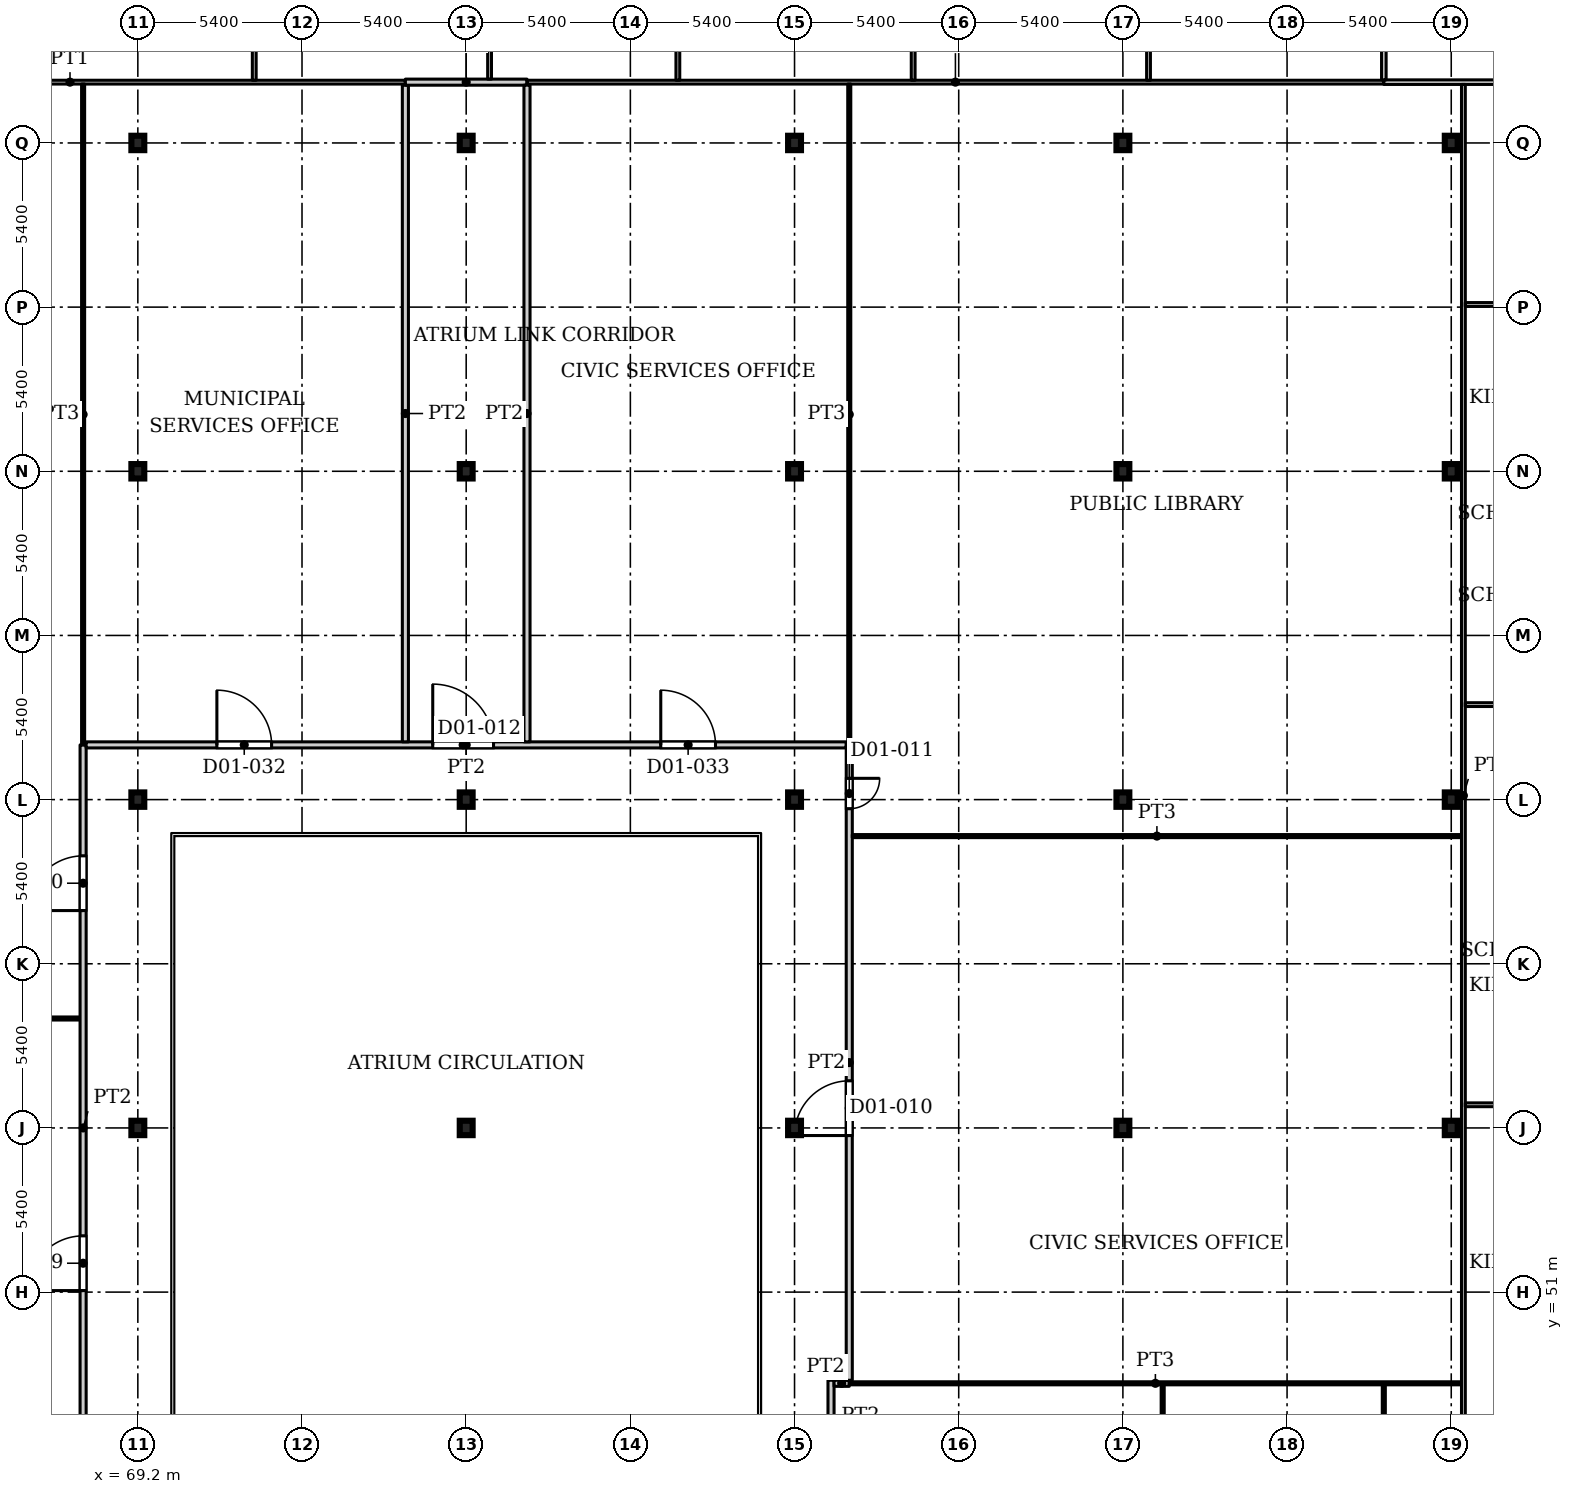
"""IFC4 building model, lengths in metres.
Left out: names, types, materials, properties, quantities, classifications, styles, units other than length and angle.
Written with IfcOpenShell. Run it as: python <this file> out.ifc"""

import sys

from ifc_helpers import new_model, si_unit, direction, frame, frame_2d, origin, origin_2d, place, context, subcontext, project, spatial, rectangle, i_section, extrude, source, transform, mapped, element, fill, save


model = new_model("IFC4")
c1 = context("Model", 3, precision=1e-05, world=origin(), true_north=direction((0.0, 1.0)))
c2 = subcontext(c1, "Body", "Model", "MODEL_VIEW")
j1 = project(units=[si_unit("LENGTHUNIT", "METRE"), si_unit("PLANEANGLEUNIT", "RADIAN")], contexts=[c1])
p1 = place(None, origin())
s1 = spatial("IfcSite", under=j1, at=p1, CompositionType="ELEMENT")
p2 = place(p1, origin())
s2 = spatial("IfcBuilding", under=s1, at=p2, CompositionType="ELEMENT")
p3 = place(p2, frame((0.0, 0.0, 7.5)))
s3 = spatial("IfcBuildingStorey", under=s2, at=p3, CompositionType="ELEMENT", Elevation=7.5)
for number, where, z_axis, x_axis in (
    (1, (69.2, 56.4, 0.0), (0.0, 0.0, 1.0), (1.0, 0.0, 0.0)),
    (2, (80.0, 56.4, 0.0), (0.0, 0.0, 1.0), (1.0, 0.0, 0.0)),
    (3, (90.8, 56.4, 0.0), (0.0, 0.0, 1.0), (1.0, 0.0, 0.0)),
    (4, (101.6, 56.4, 0.0), (0.0, 0.0, 1.0), (1.0, 0.0, 0.0)),
    (5, (112.4, 56.4, 0.0), (0.0, 0.0, 1.0), (1.0, 0.0, 0.0)),
    (6, (69.2, 67.2, 0.0), (0.0, 0.0, 1.0), (1.0, 0.0, 0.0)),
    (7, (80.0, 67.2, 0.0), (0.0, 0.0, 1.0), (1.0, 0.0, 0.0)),
    (8, (90.8, 67.2, 0.0), (0.0, 0.0, 1.0), (1.0, 0.0, 0.0)),
    (9, (101.6, 67.2, 0.0), (0.0, 0.0, 1.0), (1.0, 0.0, 0.0)),
    (10, (112.4, 67.2, 0.0), (0.0, 0.0, 1.0), (1.0, 0.0, 0.0)),
    (11, (69.2, 78.0, 0.0), (0.0, 0.0, 1.0), (1.0, 0.0, 0.0)),
    (12, (80.0, 78.0, 0.0), (0.0, 0.0, 1.0), (1.0, 0.0, 0.0)),
    (13, (90.8, 78.0, 0.0), (0.0, 0.0, 1.0), (1.0, 0.0, 0.0)),
    (14, (101.6, 78.0, 0.0), (0.0, 0.0, 1.0), (1.0, 0.0, 0.0)),
    (15, (112.4, 78.0, 0.0), (0.0, 0.0, 1.0), (1.0, 0.0, 0.0)),
    (16, (69.2, 88.8, 0.0), (0.0, 0.0, 1.0), (1.0, 0.0, 0.0)),
    (17, (80.0, 88.8, 0.0), (0.0, 0.0, 1.0), (1.0, 0.0, 0.0)),
    (18, (90.8, 88.8, 0.0), (0.0, 0.0, 1.0), (1.0, 0.0, 0.0)),
    (19, (101.6, 88.8, 0.0), (0.0, 0.0, 1.0), (1.0, 0.0, 0.0)),
    (20, (112.4, 88.8, 0.0), (0.0, 0.0, 1.0), (1.0, 0.0, 0.0)),
):
    element("IfcColumn", number, at=place(p3, frame(where, z_axis=z_axis, x_axis=x_axis)), inside=s3, PredefinedType="COLUMN", context=c2, shape_type="SweptSolid", body=[
        extrude(i_section(OverallWidth=0.424, OverallDepth=0.474, WebThickness=0.048, FlangeThickness=0.077, FilletRadius=0.014, at=origin_2d()), origin(), (0.0, 0.0, 1.0), 5.0),
    ])
p4 = place(p3, frame((33.45, 60.0, 0.0), z_axis=(0.0, 0.0, 1.0), x_axis=(1.0, 0.0, 0.0)))
e21 = element("IfcWall", 21, at=p4, inside=s3, PredefinedType="PARTITIONING", context=c2, shape_type="SweptSolid", body=[
    extrude(rectangle(XDim=33.85, YDim=0.1, at=frame_2d((16.925, 0.0))), origin(), (0.0, 0.0, 1.0), 4.68),
])
p5 = place(p3, frame((55.938, 90.8, 0.0), z_axis=(0.0, 0.0, 1.0), x_axis=(1.0, 0.0, 0.0)))
e22 = element("IfcWall", 22, at=p5, inside=s3, PredefinedType="PARTITIONING", context=c2, shape_type="SweptSolid", body=[
    extrude(rectangle(XDim=22.062, YDim=0.125, at=frame_2d((11.031, 0.0))), origin(), (0.0, 0.0, 1.0), 4.68),
])
p6 = place(p3, frame((67.4, 43.8, 0.0), z_axis=(0.0, 0.0, 1.0), x_axis=(0.0, 1.0, 0.0)))
e23 = element("IfcWall", 23, at=p6, inside=s3, PredefinedType="PARTITIONING", context=c2, shape_type="SweptSolid", body=[
    extrude(rectangle(XDim=25.2, YDim=0.2, at=frame_2d((12.6, 0.0))), origin(), (0.0, 0.0, 1.0), 4.68),
])
p7 = place(p6, frame((7.25, 0.0, 0.0)))
e24 = element("IfcOpeningElement", 24, at=p7, cuts=e23, PredefinedType="OPENING", context=c2, shape_type="SweptSolid", body=[
    extrude(rectangle(XDim=1.8, YDim=2.1, at=frame_2d((0.9, 1.05))), frame((0.0, 0.11, 0.0), z_axis=(0.0, -1.0, 0.0), x_axis=(1.0, 0.0, 0.0)), (0.0, 0.0, 1.0), 0.22),
])
p8 = place(p6, frame((19.75, 0.0, 0.0)))
e25 = element("IfcOpeningElement", 25, at=p8, cuts=e23, PredefinedType="OPENING", context=c2, shape_type="SweptSolid", body=[
    extrude(rectangle(XDim=1.8, YDim=2.1, at=frame_2d((0.9, 1.05))), frame((0.0, 0.11, 0.0), z_axis=(0.0, -1.0, 0.0), x_axis=(1.0, 0.0, 0.0)), (0.0, 0.0, 1.0), 0.22),
])
p9 = place(p3, frame((67.4, 69.0, 0.0), z_axis=(0.0, 0.0, 1.0), x_axis=(0.0, 1.0, 0.0)))
e26 = element("IfcWall", 26, at=p9, inside=s3, PredefinedType="PARTITIONING", context=c2, shape_type="SweptSolid", body=[
    extrude(rectangle(XDim=21.738, YDim=0.1, at=frame_2d((10.869, 0.0))), origin(), (0.0, 0.0, 1.0), 4.68),
])
p10 = place(p3, frame((67.5, 69.0, 0.0), z_axis=(0.0, 0.0, 1.0), x_axis=(1.0, 0.0, 0.0)))
e27 = element("IfcWall", 27, at=p10, inside=s3, PredefinedType="PARTITIONING", context=c2, shape_type="SweptSolid", body=[
    extrude(rectangle(XDim=25.0, YDim=0.2, at=frame_2d((12.5, 0.0))), origin(), (0.0, 0.0, 1.0), 4.68),
])
p11 = place(p10, frame((11.4, 0.0, 0.0)))
e28 = element("IfcOpeningElement", 28, at=p11, cuts=e27, PredefinedType="OPENING", context=c2, shape_type="SweptSolid", body=[
    extrude(rectangle(XDim=2.0, YDim=2.1, at=frame_2d((1.0, 1.05))), frame((0.0, 0.11, 0.0), z_axis=(0.0, -1.0, 0.0), x_axis=(1.0, 0.0, 0.0)), (0.0, 0.0, 1.0), 0.22),
])
p12 = place(p10, frame((4.3, 0.0, 0.0)))
e29 = element("IfcOpeningElement", 29, at=p12, cuts=e27, PredefinedType="OPENING", context=c2, shape_type="SweptSolid", body=[
    extrude(rectangle(XDim=1.8, YDim=2.1, at=frame_2d((0.9, 1.05))), frame((0.0, 0.11, 0.0), z_axis=(0.0, -1.0, 0.0), x_axis=(1.0, 0.0, 0.0)), (0.0, 0.0, 1.0), 0.22),
])
p13 = place(p10, frame((18.9, 0.0, 0.0)))
e30 = element("IfcOpeningElement", 30, at=p13, cuts=e27, PredefinedType="OPENING", context=c2, shape_type="SweptSolid", body=[
    extrude(rectangle(XDim=1.8, YDim=2.1, at=frame_2d((0.9, 1.05))), frame((0.0, 0.11, 0.0), z_axis=(0.0, -1.0, 0.0), x_axis=(1.0, 0.0, 0.0)), (0.0, 0.0, 1.0), 0.22),
])
p14 = place(p3, frame((73.029, 90.862, 0.0), z_axis=(0.0, 0.0, 1.0), x_axis=(0.0, 1.0, 0.0)))
e31 = element("IfcWall", 31, at=p14, inside=s3, PredefinedType="PARTITIONING", context=c2, shape_type="SweptSolid", body=[
    extrude(rectangle(XDim=8.238, YDim=0.125, at=frame_2d((4.119, 0.0))), origin(), (0.0, 0.0, 1.0), 4.68),
])
p15 = place(p3, frame((78.0, 69.1, 0.0), z_axis=(0.0, 0.0, 1.0), x_axis=(0.0, 1.0, 0.0)))
e32 = element("IfcWall", 32, at=p15, inside=s3, PredefinedType="PARTITIONING", context=c2, shape_type="SweptSolid", body=[
    extrude(rectangle(XDim=21.6, YDim=0.2, at=frame_2d((10.8, 0.0))), origin(), (0.0, 0.0, 1.0), 4.68),
])
p16 = place(p3, frame((78.0, 90.8, 0.0), z_axis=(0.0, 0.0, 1.0), x_axis=(1.0, 0.0, 0.0)))
e33 = element("IfcWall", 33, at=p16, inside=s3, PredefinedType="PARTITIONING", context=c2, shape_type="SweptSolid", body=[
    extrude(rectangle(XDim=4.0, YDim=0.2, at=frame_2d((2.0, 0.0))), origin(), (0.0, 0.0, 1.0), 4.68),
])
p17 = place(p3, frame((80.769, 90.9, 0.0), z_axis=(0.0, 0.0, 1.0), x_axis=(0.0, 1.0, 0.0)))
e34 = element("IfcWall", 34, at=p17, inside=s3, PredefinedType="PARTITIONING", context=c2, shape_type="SweptSolid", body=[
    extrude(rectangle(XDim=8.2, YDim=0.125, at=frame_2d((4.1, 0.0))), origin(), (0.0, 0.0, 1.0), 4.68),
])
p18 = place(p3, frame((82.0, 69.1, 0.0), z_axis=(0.0, 0.0, 1.0), x_axis=(0.0, 1.0, 0.0)))
e35 = element("IfcWall", 35, at=p18, inside=s3, PredefinedType="PARTITIONING", context=c2, shape_type="SweptSolid", body=[
    extrude(rectangle(XDim=21.6, YDim=0.2, at=frame_2d((10.8, 0.0))), origin(), (0.0, 0.0, 1.0), 4.68),
])
p19 = place(p3, frame((82.0, 90.8, 0.0), z_axis=(0.0, 0.0, 1.0), x_axis=(1.0, 0.0, 0.0)))
e36 = element("IfcWall", 36, at=p19, inside=s3, PredefinedType="PARTITIONING", context=c2, shape_type="SweptSolid", body=[
    extrude(rectangle(XDim=28.183, YDim=0.125, at=frame_2d((14.092, 0.0))), origin(), (0.0, 0.0, 1.0), 4.68),
])
p20 = place(p3, frame((86.962, 90.862, 0.0), z_axis=(0.0, 0.0, 1.0), x_axis=(0.0, 1.0, 0.0)))
e37 = element("IfcWall", 37, at=p20, inside=s3, PredefinedType="PARTITIONING", context=c2, shape_type="SweptSolid", body=[
    extrude(rectangle(XDim=8.238, YDim=0.125, at=frame_2d((4.119, 0.0))), origin(), (0.0, 0.0, 1.0), 4.68),
])
p21 = place(p3, frame((92.0, 43.8, 0.0), z_axis=(0.0, 0.0, 1.0), x_axis=(0.0, 1.0, 0.0)))
e38 = element("IfcWall", 38, at=p21, inside=s3, PredefinedType="PARTITIONING", context=c2, shape_type="SweptSolid", body=[
    extrude(rectangle(XDim=4.3, YDim=0.2, at=frame_2d((2.15, 0.0))), origin(), (0.0, 0.0, 1.0), 4.68),
])
p22 = place(p3, frame((92.1, 48.0, 0.0), z_axis=(0.0, 0.0, 1.0), x_axis=(1.0, 0.0, 0.0)))
e39 = element("IfcWall", 39, at=p22, inside=s3, PredefinedType="PARTITIONING", context=c2, shape_type="SweptSolid", body=[
    extrude(rectangle(XDim=0.5, YDim=0.2, at=frame_2d((0.25, 0.0))), origin(), (0.0, 0.0, 1.0), 4.68),
])
p23 = place(p3, frame((92.6, 48.0, 0.0), z_axis=(0.0, 0.0, 1.0), x_axis=(1.0, 0.0, 0.0)))
e40 = element("IfcWall", 40, at=p23, inside=s3, PredefinedType="PARTITIONING", context=c2, shape_type="SweptSolid", body=[
    extrude(rectangle(XDim=20.138, YDim=0.1, at=frame_2d((10.069, 0.0))), origin(), (0.0, 0.0, 1.0), 4.68),
])
p24 = place(p3, frame((92.6, 48.1, 0.0), z_axis=(0.0, 0.0, 1.0), x_axis=(0.0, 1.0, 0.0)))
e41 = element("IfcWall", 41, at=p24, inside=s3, PredefinedType="PARTITIONING", context=c2, shape_type="SweptSolid", body=[
    extrude(rectangle(XDim=20.9, YDim=0.2, at=frame_2d((10.45, 0.0))), origin(), (0.0, 0.0, 1.0), 4.68),
])
p25 = place(p24, frame((8.05, 0.0, 0.0)))
e42 = element("IfcOpeningElement", 42, at=p25, cuts=e41, PredefinedType="OPENING", context=c2, shape_type="SweptSolid", body=[
    extrude(rectangle(XDim=1.8, YDim=2.1, at=frame_2d((0.9, 1.05))), frame((0.0, 0.11, 0.0), z_axis=(0.0, -1.0, 0.0), x_axis=(1.0, 0.0, 0.0)), (0.0, 0.0, 1.0), 0.22),
])
p26 = place(p24, frame((18.8, 0.0, 0.0)))
e43 = element("IfcOpeningElement", 43, at=p26, cuts=e41, PredefinedType="OPENING", context=c2, shape_type="SweptSolid", body=[
    extrude(rectangle(XDim=1.0, YDim=2.1, at=frame_2d((0.5, 1.05))), frame((0.0, 0.11, 0.0), z_axis=(0.0, -1.0, 0.0), x_axis=(1.0, 0.0, 0.0)), (0.0, 0.0, 1.0), 0.22),
])
p27 = place(p3, frame((92.6, 69.0, 0.0), z_axis=(0.0, 0.0, 1.0), x_axis=(0.0, 1.0, 0.0)))
e44 = element("IfcWall", 44, at=p27, inside=s3, PredefinedType="PARTITIONING", context=c2, shape_type="SweptSolid", body=[
    extrude(rectangle(XDim=21.738, YDim=0.1, at=frame_2d((10.869, 0.0))), origin(), (0.0, 0.0, 1.0), 4.68),
])
p28 = place(p3, frame((92.7, 66.0, 0.0), z_axis=(0.0, 0.0, 1.0), x_axis=(1.0, 0.0, 0.0)))
e45 = element("IfcWall", 45, at=p28, inside=s3, PredefinedType="PARTITIONING", context=c2, shape_type="SweptSolid", body=[
    extrude(rectangle(XDim=20.038, YDim=0.1, at=frame_2d((10.019, 0.0))), origin(), (0.0, 0.0, 1.0), 4.68),
])
for number, where, z_axis, x_axis in (
    (46, (94.702, 90.862, 0.0), (0.0, 0.0, 1.0), (0.0, 1.0, 0.0)),
    (47, (102.443, 90.862, 0.0), (0.0, 0.0, 1.0), (0.0, 1.0, 0.0)),
):
    element("IfcWall", number, at=place(p3, frame(where, z_axis=z_axis, x_axis=x_axis)), inside=s3, PredefinedType="PARTITIONING", context=c2, shape_type="SweptSolid", body=[
        extrude(rectangle(XDim=8.238, YDim=0.125, at=frame_2d((4.119, 0.0))), origin(), (0.0, 0.0, 1.0), 4.68),
    ])
for number, where, z_axis, x_axis in (
    (48, (102.909, 35.3, 0.0), (0.0, 0.0, 1.0), (0.0, 1.0, 0.0)),
    (49, (110.182, 35.3, 0.0), (0.0, 0.0, 1.0), (0.0, 1.0, 0.0)),
):
    element("IfcWall", number, at=place(p3, frame(where, z_axis=z_axis, x_axis=x_axis)), inside=s3, PredefinedType="PARTITIONING", context=c2, shape_type="SweptSolid", body=[
        extrude(rectangle(XDim=12.65, YDim=0.1, at=frame_2d((6.325, 0.0))), origin(), (0.0, 0.0, 1.0), 4.68),
    ])
p29 = place(p3, frame((110.183, 90.8, 0.0), z_axis=(0.0, 0.0, 1.0), x_axis=(1.0, 0.0, 0.0)))
e50 = element("IfcWall", 50, at=p29, inside=s3, PredefinedType="PARTITIONING", context=c2, shape_type="SweptSolid", body=[
    extrude(rectangle(XDim=10.321, YDim=0.15, at=frame_2d((5.16, 0.0))), origin(), (0.0, 0.0, 1.0), 4.68),
])
p30 = place(p3, frame((110.183, 90.875, 0.0), z_axis=(0.0, 0.0, 1.0), x_axis=(0.0, 1.0, 0.0)))
e51 = element("IfcWall", 51, at=p30, inside=s3, PredefinedType="PARTITIONING", context=c2, shape_type="SweptSolid", body=[
    extrude(rectangle(XDim=8.225, YDim=0.15, at=frame_2d((4.113, 0.0))), origin(), (0.0, 0.0, 1.0), 4.68),
])
p31 = place(p3, frame((112.8, 43.938, 0.0), z_axis=(0.0, 0.0, 1.0), x_axis=(0.0, 1.0, 0.0)))
e52 = element("IfcWall", 52, at=p31, inside=s3, PredefinedType="PARTITIONING", context=c2, shape_type="SweptSolid", body=[
    extrude(rectangle(XDim=46.787, YDim=0.125, at=frame_2d((23.394, 0.0))), origin(), (0.0, 0.0, 1.0), 4.68),
])
p32 = place(p3, frame((112.862, 57.162, 0.0), z_axis=(0.0, 0.0, 1.0), x_axis=(1.0, 0.0, 0.0)))
e53 = element("IfcWall", 53, at=p32, inside=s3, PredefinedType="PARTITIONING", context=c2, shape_type="SweptSolid", body=[
    extrude(rectangle(XDim=8.238, YDim=0.125, at=frame_2d((4.119, 0.0))), origin(), (0.0, 0.0, 1.0), 4.68),
])
p33 = place(p3, frame((112.862, 70.325, 0.0), z_axis=(0.0, 0.0, 1.0), x_axis=(1.0, 0.0, 0.0)))
e54 = element("IfcWall", 54, at=p33, inside=s3, PredefinedType="PARTITIONING", context=c2, shape_type="SweptSolid", body=[
    extrude(rectangle(XDim=5.514, YDim=0.125, at=frame_2d((2.757, 0.0))), origin(), (0.0, 0.0, 1.0), 4.68),
])
p34 = place(p3, frame((112.862, 83.487, 0.0), z_axis=(0.0, 0.0, 1.0), x_axis=(1.0, 0.0, 0.0)))
e55 = element("IfcWall", 55, at=p34, inside=s3, PredefinedType="PARTITIONING", context=c2, shape_type="SweptSolid", body=[
    extrude(rectangle(XDim=8.238, YDim=0.125, at=frame_2d((4.119, 0.0))), origin(), (0.0, 0.0, 1.0), 4.68),
])
m1 = source(origin(), c2, "Body", "SweptSolid", [
    extrude(rectangle(XDim=1.8, YDim=2.1, at=frame_2d((0.9, 1.05))), frame((0.0, 0.025, 0.0), z_axis=(0.0, -1.0, 0.0), x_axis=(1.0, 0.0, 0.0)), (0.0, 0.0, 1.0), 0.05),
])
p35 = place(p25, origin())
e56 = element("IfcDoor", 56, at=p35, inside=s3, OperationType="DOUBLE_DOOR_SINGLE_SWING", PredefinedType="DOOR", context=c2, shape_type="MappedRepresentation", body=[
    mapped(m1, transform((0.0, 0.0, 0.0), x_axis=(1.0, 0.0, 0.0), y_axis=(0.0, 1.0, 0.0), z_axis=(0.0, 0.0, 1.0), scale=1.0)),
])
fill(e42, e56)
m2 = source(origin(), c2, "Body", "SweptSolid", [
    extrude(rectangle(XDim=1.0, YDim=2.1, at=frame_2d((0.5, 1.05))), frame((0.0, 0.025, 0.0), z_axis=(0.0, -1.0, 0.0), x_axis=(1.0, 0.0, 0.0)), (0.0, 0.0, 1.0), 0.05),
])
p36 = place(p26, origin())
e57 = element("IfcDoor", 57, at=p36, inside=s3, OperationType="SINGLE_SWING_RIGHT", PredefinedType="DOOR", context=c2, shape_type="MappedRepresentation", body=[
    mapped(m2, transform((0.0, 0.0, 0.0), x_axis=(1.0, 0.0, 0.0), y_axis=(0.0, 1.0, 0.0), z_axis=(0.0, 0.0, 1.0), scale=1.0)),
])
fill(e43, e57)
m3 = source(origin(), c2, "Body", "SweptSolid", [
    extrude(rectangle(XDim=2.0, YDim=2.1, at=frame_2d((1.0, 1.05))), frame((0.0, 0.025, 0.0), z_axis=(0.0, -1.0, 0.0), x_axis=(1.0, 0.0, 0.0)), (0.0, 0.0, 1.0), 0.05),
])
p37 = place(p11, origin())
e58 = element("IfcDoor", 58, at=p37, inside=s3, OperationType="DOUBLE_DOOR_SINGLE_SWING", PredefinedType="DOOR", context=c2, shape_type="MappedRepresentation", body=[
    mapped(m3, transform((0.0, 0.0, 0.0), x_axis=(1.0, 0.0, 0.0), y_axis=(0.0, 1.0, 0.0), z_axis=(0.0, 0.0, 1.0), scale=1.0)),
])
fill(e28, e58)
p38 = place(p12, origin())
e59 = element("IfcDoor", 59, at=p38, inside=s3, OperationType="DOUBLE_DOOR_SINGLE_SWING", PredefinedType="DOOR", context=c2, shape_type="MappedRepresentation", body=[
    mapped(m1, transform((0.0, 0.0, 0.0), x_axis=(1.0, 0.0, 0.0), y_axis=(0.0, 1.0, 0.0), z_axis=(0.0, 0.0, 1.0), scale=1.0)),
])
fill(e29, e59)
p39 = place(p13, origin())
e60 = element("IfcDoor", 60, at=p39, inside=s3, OperationType="DOUBLE_DOOR_SINGLE_SWING", PredefinedType="DOOR", context=c2, shape_type="MappedRepresentation", body=[
    mapped(m1, transform((0.0, 0.0, 0.0), x_axis=(1.0, 0.0, 0.0), y_axis=(0.0, 1.0, 0.0), z_axis=(0.0, 0.0, 1.0), scale=1.0)),
])
fill(e30, e60)
p40 = place(p7, origin())
e61 = element("IfcDoor", 61, at=p40, inside=s3, OperationType="DOUBLE_DOOR_SINGLE_SWING", PredefinedType="DOOR", context=c2, shape_type="MappedRepresentation", body=[
    mapped(m1, transform((0.0, 0.0, 0.0), x_axis=(1.0, 0.0, 0.0), y_axis=(0.0, 1.0, 0.0), z_axis=(0.0, 0.0, 1.0), scale=1.0)),
])
fill(e24, e61)
p41 = place(p8, origin())
e62 = element("IfcDoor", 62, at=p41, inside=s3, OperationType="DOUBLE_DOOR_SINGLE_SWING", PredefinedType="DOOR", context=c2, shape_type="MappedRepresentation", body=[
    mapped(m1, transform((0.0, 0.0, 0.0), x_axis=(1.0, 0.0, 0.0), y_axis=(0.0, 1.0, 0.0), z_axis=(0.0, 0.0, 1.0), scale=1.0)),
])
fill(e25, e62)
save(model, sys.argv[1])
